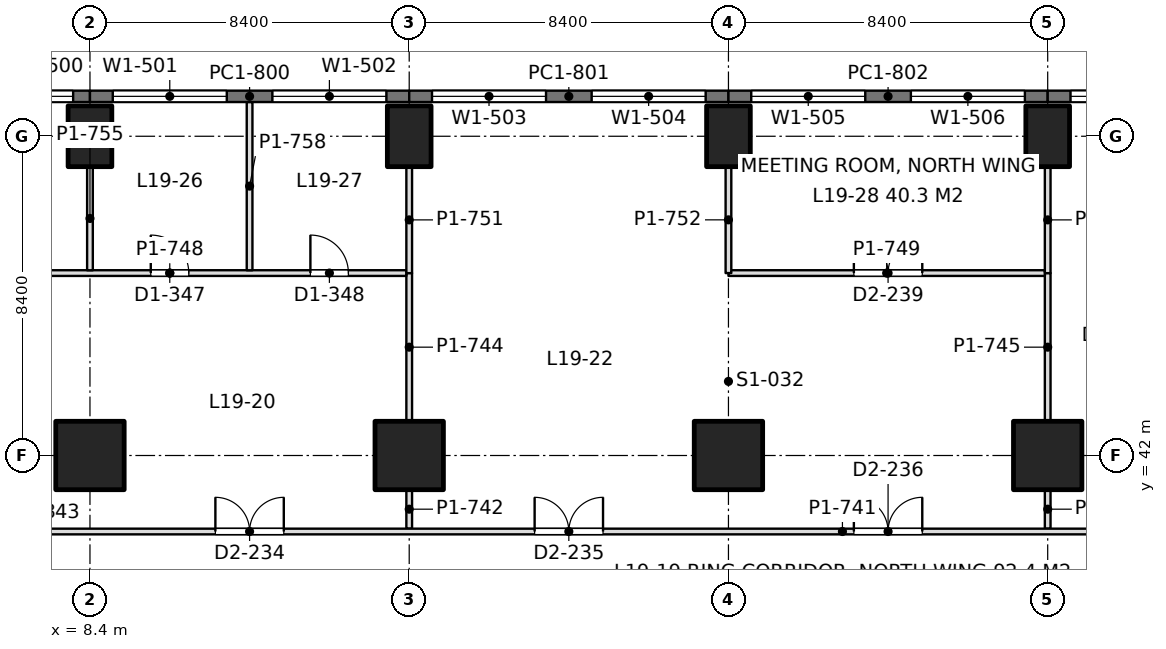
"""IFC4 building model, lengths in metres.
Left out: names, types, materials, properties, quantities, classifications, styles, units other than length and angle.
Written with IfcOpenShell. Run it as: python <this file> out.ifc"""

import sys

from ifc_helpers import new_model, si_unit, direction, frame, frame_2d, origin, origin_2d, place, context, subcontext, project, spatial, rectangle, extrude, element, fill, save


model = new_model("IFC4")
c1 = context("Model", 3, precision=1e-05, world=origin(), true_north=direction((0.0, 1.0)))
c2 = subcontext(c1, "Body", "Model", "MODEL_VIEW")
j1 = project(units=[si_unit("LENGTHUNIT", "METRE"), si_unit("PLANEANGLEUNIT", "RADIAN")], contexts=[c1])
p1 = place(None, origin())
s1 = spatial("IfcSite", under=j1, at=p1, CompositionType="ELEMENT")
p2 = place(p1, origin())
s2 = spatial("IfcBuilding", under=s1, at=p2, CompositionType="ELEMENT")
p3 = place(p2, frame((0.0, 0.0, 86.4)))
s3 = spatial("IfcBuildingStorey", under=s2, at=p3, CompositionType="ELEMENT", Elevation=86.4)
p4 = place(p3, frame((8.4, 42.0, 0.0), z_axis=(0.0, 0.0, 1.0), x_axis=(1.0, 0.0, 0.0)))
e1 = element("IfcColumn", 1, at=p4, inside=s3, PredefinedType="COLUMN", context=c2, shape_type="SweptSolid", body=[
    extrude(rectangle(XDim=1.8, YDim=1.8, at=origin_2d()), origin(), (0.0, 0.0, 1.0), 4.5),
])
p5 = place(p3, frame((8.4, 50.4, 0.0), z_axis=(0.0, 0.0, 1.0), x_axis=(1.0, 0.0, 0.0)))
e2 = element("IfcColumn", 2, at=p5, inside=s3, PredefinedType="COLUMN", context=c2, shape_type="SweptSolid", body=[
    extrude(rectangle(XDim=1.15, YDim=1.6, at=origin_2d()), origin(), (0.0, 0.0, 1.0), 4.5),
])
p6 = place(p3, frame((16.8, 42.0, 0.0), z_axis=(0.0, 0.0, 1.0), x_axis=(1.0, 0.0, 0.0)))
e3 = element("IfcColumn", 3, at=p6, inside=s3, PredefinedType="COLUMN", context=c2, shape_type="SweptSolid", body=[
    extrude(rectangle(XDim=1.8, YDim=1.8, at=origin_2d()), origin(), (0.0, 0.0, 1.0), 4.5),
])
p7 = place(p3, frame((16.8, 50.4, 0.0), z_axis=(0.0, 0.0, 1.0), x_axis=(1.0, 0.0, 0.0)))
e4 = element("IfcColumn", 4, at=p7, inside=s3, PredefinedType="COLUMN", context=c2, shape_type="SweptSolid", body=[
    extrude(rectangle(XDim=1.15, YDim=1.6, at=origin_2d()), origin(), (0.0, 0.0, 1.0), 4.5),
])
p8 = place(p3, frame((25.2, 42.0, 0.0), z_axis=(0.0, 0.0, 1.0), x_axis=(1.0, 0.0, 0.0)))
e5 = element("IfcColumn", 5, at=p8, inside=s3, PredefinedType="COLUMN", context=c2, shape_type="SweptSolid", body=[
    extrude(rectangle(XDim=1.8, YDim=1.8, at=origin_2d()), origin(), (0.0, 0.0, 1.0), 4.5),
])
p9 = place(p3, frame((25.2, 50.4, 0.0), z_axis=(0.0, 0.0, 1.0), x_axis=(1.0, 0.0, 0.0)))
e6 = element("IfcColumn", 6, at=p9, inside=s3, PredefinedType="COLUMN", context=c2, shape_type="SweptSolid", body=[
    extrude(rectangle(XDim=1.15, YDim=1.6, at=origin_2d()), origin(), (0.0, 0.0, 1.0), 4.5),
])
p10 = place(p3, frame((33.6, 42.0, 0.0), z_axis=(0.0, 0.0, 1.0), x_axis=(1.0, 0.0, 0.0)))
e7 = element("IfcColumn", 7, at=p10, inside=s3, PredefinedType="COLUMN", context=c2, shape_type="SweptSolid", body=[
    extrude(rectangle(XDim=1.8, YDim=1.8, at=origin_2d()), origin(), (0.0, 0.0, 1.0), 4.5),
])
p11 = place(p3, frame((33.6, 50.4, 0.0), z_axis=(0.0, 0.0, 1.0), x_axis=(1.0, 0.0, 0.0)))
e8 = element("IfcColumn", 8, at=p11, inside=s3, PredefinedType="COLUMN", context=c2, shape_type="SweptSolid", body=[
    extrude(rectangle(XDim=1.15, YDim=1.6, at=origin_2d()), origin(), (0.0, 0.0, 1.0), 4.5),
])
p12 = place(p3, frame((0.315, 51.45, 0.0), z_axis=(0.0, 0.0, 1.0), x_axis=(1.0, 0.0, 0.0)))
e9 = element("IfcWall", 9, at=p12, inside=s3, PredefinedType="SOLIDWALL", context=c2, shape_type="SweptSolid", body=[
    extrude(rectangle(XDim=8.085, YDim=0.3, at=frame_2d((4.042, 0.0))), origin(), (0.0, 0.0, 1.0), 4.3),
])
p13 = place(p12, frame((0.443, 0.0, 0.9)))
e10 = element("IfcOpeningElement", 10, at=p13, cuts=e9, PredefinedType="OPENING", context=c2, shape_type="SweptSolid", body=[
    extrude(rectangle(XDim=3.0, YDim=1.9, at=frame_2d((1.5, 0.95))), frame((0.0, 0.16, 0.0), z_axis=(0.0, -1.0, 0.0), x_axis=(1.0, 0.0, 0.0)), (0.0, 0.0, 1.0), 0.32),
])
p14 = place(p12, frame((4.643, 0.0, 0.9)))
e11 = element("IfcOpeningElement", 11, at=p14, cuts=e9, PredefinedType="OPENING", context=c2, shape_type="SweptSolid", body=[
    extrude(rectangle(XDim=3.0, YDim=1.9, at=frame_2d((1.5, 0.95))), frame((0.0, 0.16, 0.0), z_axis=(0.0, -1.0, 0.0), x_axis=(1.0, 0.0, 0.0)), (0.0, 0.0, 1.0), 0.32),
])
p15 = place(p3, frame((8.4, 51.45, 0.0), z_axis=(0.0, 0.0, 1.0), x_axis=(1.0, 0.0, 0.0)))
e12 = element("IfcWall", 12, at=p15, inside=s3, PredefinedType="SOLIDWALL", context=c2, shape_type="SweptSolid", body=[
    extrude(rectangle(XDim=8.4, YDim=0.3, at=frame_2d((4.2, 0.0))), origin(), (0.0, 0.0, 1.0), 4.3),
])
p16 = place(p15, frame((0.6, 0.0, 0.9)))
e13 = element("IfcOpeningElement", 13, at=p16, cuts=e12, PredefinedType="OPENING", context=c2, shape_type="SweptSolid", body=[
    extrude(rectangle(XDim=3.0, YDim=1.9, at=frame_2d((1.5, 0.95))), frame((0.0, 0.16, 0.0), z_axis=(0.0, -1.0, 0.0), x_axis=(1.0, 0.0, 0.0)), (0.0, 0.0, 1.0), 0.32),
])
p17 = place(p15, frame((4.8, 0.0, 0.9)))
e14 = element("IfcOpeningElement", 14, at=p17, cuts=e12, PredefinedType="OPENING", context=c2, shape_type="SweptSolid", body=[
    extrude(rectangle(XDim=3.0, YDim=1.9, at=frame_2d((1.5, 0.95))), frame((0.0, 0.16, 0.0), z_axis=(0.0, -1.0, 0.0), x_axis=(1.0, 0.0, 0.0)), (0.0, 0.0, 1.0), 0.32),
])
p18 = place(p3, frame((16.8, 51.45, 0.0), z_axis=(0.0, 0.0, 1.0), x_axis=(1.0, 0.0, 0.0)))
e15 = element("IfcWall", 15, at=p18, inside=s3, PredefinedType="SOLIDWALL", context=c2, shape_type="SweptSolid", body=[
    extrude(rectangle(XDim=8.4, YDim=0.3, at=frame_2d((4.2, 0.0))), origin(), (0.0, 0.0, 1.0), 4.3),
])
p19 = place(p18, frame((0.6, 0.0, 0.9)))
e16 = element("IfcOpeningElement", 16, at=p19, cuts=e15, PredefinedType="OPENING", context=c2, shape_type="SweptSolid", body=[
    extrude(rectangle(XDim=3.0, YDim=1.9, at=frame_2d((1.5, 0.95))), frame((0.0, 0.16, 0.0), z_axis=(0.0, -1.0, 0.0), x_axis=(1.0, 0.0, 0.0)), (0.0, 0.0, 1.0), 0.32),
])
p20 = place(p18, frame((4.8, 0.0, 0.9)))
e17 = element("IfcOpeningElement", 17, at=p20, cuts=e15, PredefinedType="OPENING", context=c2, shape_type="SweptSolid", body=[
    extrude(rectangle(XDim=3.0, YDim=1.9, at=frame_2d((1.5, 0.95))), frame((0.0, 0.16, 0.0), z_axis=(0.0, -1.0, 0.0), x_axis=(1.0, 0.0, 0.0)), (0.0, 0.0, 1.0), 0.32),
])
p21 = place(p3, frame((25.2, 51.45, 0.0), z_axis=(0.0, 0.0, 1.0), x_axis=(1.0, 0.0, 0.0)))
e18 = element("IfcWall", 18, at=p21, inside=s3, PredefinedType="SOLIDWALL", context=c2, shape_type="SweptSolid", body=[
    extrude(rectangle(XDim=8.4, YDim=0.3, at=frame_2d((4.2, 0.0))), origin(), (0.0, 0.0, 1.0), 4.3),
])
p22 = place(p21, frame((0.6, 0.0, 0.9)))
e19 = element("IfcOpeningElement", 19, at=p22, cuts=e18, PredefinedType="OPENING", context=c2, shape_type="SweptSolid", body=[
    extrude(rectangle(XDim=3.0, YDim=1.9, at=frame_2d((1.5, 0.95))), frame((0.0, 0.16, 0.0), z_axis=(0.0, -1.0, 0.0), x_axis=(1.0, 0.0, 0.0)), (0.0, 0.0, 1.0), 0.32),
])
p23 = place(p21, frame((4.8, 0.0, 0.9)))
e20 = element("IfcOpeningElement", 20, at=p23, cuts=e18, PredefinedType="OPENING", context=c2, shape_type="SweptSolid", body=[
    extrude(rectangle(XDim=3.0, YDim=1.9, at=frame_2d((1.5, 0.95))), frame((0.0, 0.16, 0.0), z_axis=(0.0, -1.0, 0.0), x_axis=(1.0, 0.0, 0.0)), (0.0, 0.0, 1.0), 0.32),
])
p24 = place(p3, frame((33.6, 51.45, 0.0), z_axis=(0.0, 0.0, 1.0), x_axis=(1.0, 0.0, 0.0)))
e21 = element("IfcWall", 21, at=p24, inside=s3, PredefinedType="SOLIDWALL", context=c2, shape_type="SweptSolid", body=[
    extrude(rectangle(XDim=8.4, YDim=0.3, at=frame_2d((4.2, 0.0))), origin(), (0.0, 0.0, 1.0), 4.3),
])
p25 = place(p24, frame((0.6, 0.0, 0.9)))
e22 = element("IfcOpeningElement", 22, at=p25, cuts=e21, PredefinedType="OPENING", context=c2, shape_type="SweptSolid", body=[
    extrude(rectangle(XDim=3.0, YDim=1.9, at=frame_2d((1.5, 0.95))), frame((0.0, 0.16, 0.0), z_axis=(0.0, -1.0, 0.0), x_axis=(1.0, 0.0, 0.0)), (0.0, 0.0, 1.0), 0.32),
])
p26 = place(p24, frame((4.8, 0.0, 0.9)))
e23 = element("IfcOpeningElement", 23, at=p26, cuts=e21, PredefinedType="OPENING", context=c2, shape_type="SweptSolid", body=[
    extrude(rectangle(XDim=3.0, YDim=1.9, at=frame_2d((1.5, 0.95))), frame((0.0, 0.16, 0.0), z_axis=(0.0, -1.0, 0.0), x_axis=(1.0, 0.0, 0.0)), (0.0, 0.0, 1.0), 0.32),
])
p27 = place(p3, frame((4.274, 46.8, 0.0), z_axis=(0.0, 0.0, 1.0), x_axis=(1.0, 0.0, 0.0)))
e24 = element("IfcWall", 24, at=p27, inside=s3, PredefinedType="PARTITIONING", context=c2, shape_type="SweptSolid", body=[
    extrude(rectangle(XDim=12.452, YDim=0.15, at=frame_2d((6.226, 0.0))), origin(), (0.0, 0.0, 1.0), 3.6),
])
p28 = place(p27, frame((1.526, 0.0, 0.0)))
e25 = element("IfcOpeningElement", 25, at=p28, cuts=e24, PredefinedType="OPENING", context=c2, shape_type="SweptSolid", body=[
    extrude(rectangle(XDim=1.0, YDim=2.2, at=frame_2d((0.5, 1.1))), frame((0.0, 0.085, 0.0), z_axis=(0.0, -1.0, 0.0), x_axis=(1.0, 0.0, 0.0)), (0.0, 0.0, 1.0), 0.17),
])
p29 = place(p27, frame((5.726, 0.0, 0.0)))
e26 = element("IfcOpeningElement", 26, at=p29, cuts=e24, PredefinedType="OPENING", context=c2, shape_type="SweptSolid", body=[
    extrude(rectangle(XDim=1.0, YDim=2.2, at=frame_2d((0.5, 1.1))), frame((0.0, 0.085, 0.0), z_axis=(0.0, -1.0, 0.0), x_axis=(1.0, 0.0, 0.0)), (0.0, 0.0, 1.0), 0.17),
])
p30 = place(p27, frame((9.926, 0.0, 0.0)))
e27 = element("IfcOpeningElement", 27, at=p30, cuts=e24, PredefinedType="OPENING", context=c2, shape_type="SweptSolid", body=[
    extrude(rectangle(XDim=1.0, YDim=2.2, at=frame_2d((0.5, 1.1))), frame((0.0, 0.085, 0.0), z_axis=(0.0, -1.0, 0.0), x_axis=(1.0, 0.0, 0.0)), (0.0, 0.0, 1.0), 0.17),
])
p31 = place(p3, frame((8.4, 46.874, 0.0), z_axis=(0.0, 0.0, 1.0), x_axis=(0.0, 1.0, 0.0)))
e28 = element("IfcWall", 28, at=p31, inside=s3, PredefinedType="PARTITIONING", context=c2, shape_type="SweptSolid", body=[
    extrude(rectangle(XDim=2.727, YDim=0.15, at=frame_2d((1.364, 0.0))), origin(), (0.0, 0.0, 1.0), 3.6),
])
p32 = place(p3, frame((12.6, 46.874, 0.0), z_axis=(0.0, 0.0, 1.0), x_axis=(0.0, 1.0, 0.0)))
e29 = element("IfcWall", 29, at=p32, inside=s3, PredefinedType="PARTITIONING", context=c2, shape_type="SweptSolid", body=[
    extrude(rectangle(XDim=4.428, YDim=0.15, at=frame_2d((2.214, 0.0))), origin(), (0.0, 0.0, 1.0), 3.854),
])
p33 = place(p3, frame((16.8, 46.798, 0.0), z_axis=(0.0, 0.0, 1.0), x_axis=(0.0, 1.0, 0.0)))
e30 = element("IfcWall", 30, at=p33, inside=s3, PredefinedType="PARTITIONING", context=c2, shape_type="SweptSolid", body=[
    extrude(rectangle(XDim=2.803, YDim=0.15, at=frame_2d((1.401, 0.0))), origin(), (0.0, 0.0, 1.0), 3.6),
])
p34 = place(p3, frame((25.2, 46.8, 0.0), z_axis=(0.0, 0.0, 1.0), x_axis=(1.0, 0.0, 0.0)))
e31 = element("IfcWall", 31, at=p34, inside=s3, PredefinedType="PARTITIONING", context=c2, shape_type="SweptSolid", body=[
    extrude(rectangle(XDim=8.326, YDim=0.15, at=frame_2d((4.163, 0.0))), origin(), (0.0, 0.0, 1.0), 3.6),
])
p35 = place(p34, frame((3.3, 0.0, 0.0)))
e32 = element("IfcOpeningElement", 32, at=p35, cuts=e31, PredefinedType="OPENING", context=c2, shape_type="SweptSolid", body=[
    extrude(rectangle(XDim=1.8, YDim=2.2, at=frame_2d((0.9, 1.1))), frame((0.0, 0.085, 0.0), z_axis=(0.0, -1.0, 0.0), x_axis=(1.0, 0.0, 0.0)), (0.0, 0.0, 1.0), 0.17),
])
p36 = place(p3, frame((25.2, 46.8, 0.0), z_axis=(0.0, 0.0, 1.0), x_axis=(0.0, 1.0, 0.0)))
e33 = element("IfcWall", 33, at=p36, inside=s3, PredefinedType="PARTITIONING", context=c2, shape_type="SweptSolid", body=[
    extrude(rectangle(XDim=2.801, YDim=0.15, at=frame_2d((1.4, 0.0))), origin(), (0.0, 0.0, 1.0), 3.6),
])
p37 = place(p3, frame((33.6, 46.798, 0.0), z_axis=(0.0, 0.0, 1.0), x_axis=(0.0, 1.0, 0.0)))
e34 = element("IfcWall", 34, at=p37, inside=s3, PredefinedType="PARTITIONING", context=c2, shape_type="SweptSolid", body=[
    extrude(rectangle(XDim=2.803, YDim=0.15, at=frame_2d((1.401, 0.0))), origin(), (0.0, 0.0, 1.0), 3.6),
])
p38 = place(p3, frame((16.8, 40.074, 0.0), z_axis=(0.0, 0.0, 1.0), x_axis=(0.0, 1.0, 0.0)))
e35 = element("IfcWall", 35, at=p38, inside=s3, PredefinedType="PARTITIONING", context=c2, shape_type="SweptSolid", body=[
    extrude(rectangle(XDim=1.027, YDim=0.15, at=frame_2d((0.514, 0.0))), origin(), (0.0, 0.0, 1.0), 3.804),
])
p39 = place(p3, frame((16.8, 42.899, 0.0), z_axis=(0.0, 0.0, 1.0), x_axis=(0.0, 1.0, 0.0)))
e36 = element("IfcWall", 36, at=p39, inside=s3, PredefinedType="PARTITIONING", context=c2, shape_type="SweptSolid", body=[
    extrude(rectangle(XDim=3.903, YDim=0.15, at=frame_2d((1.952, 0.0))), origin(), (0.0, 0.0, 1.0), 3.6),
])
p40 = place(p3, frame((33.6, 40.074, 0.0), z_axis=(0.0, 0.0, 1.0), x_axis=(0.0, 1.0, 0.0)))
e37 = element("IfcWall", 37, at=p40, inside=s3, PredefinedType="PARTITIONING", context=c2, shape_type="SweptSolid", body=[
    extrude(rectangle(XDim=1.027, YDim=0.15, at=frame_2d((0.514, 0.0))), origin(), (0.0, 0.0, 1.0), 3.804),
])
p41 = place(p3, frame((33.6, 42.899, 0.0), z_axis=(0.0, 0.0, 1.0), x_axis=(0.0, 1.0, 0.0)))
e38 = element("IfcWall", 38, at=p41, inside=s3, PredefinedType="PARTITIONING", context=c2, shape_type="SweptSolid", body=[
    extrude(rectangle(XDim=3.903, YDim=0.15, at=frame_2d((1.952, 0.0))), origin(), (0.0, 0.0, 1.0), 3.6),
])
p42 = place(p3, frame((7.198, 40.0, 0.0), z_axis=(0.0, 0.0, 1.0), x_axis=(1.0, 0.0, 0.0)))
e39 = element("IfcWall", 39, at=p42, inside=s3, PredefinedType="PARTITIONING", context=c2, shape_type="SweptSolid", body=[
    extrude(rectangle(XDim=42.002, YDim=0.15, at=frame_2d((21.001, 0.0))), origin(), (0.0, 0.0, 1.0), 3.6),
])
p43 = place(p42, frame((4.502, 0.0, 0.0)))
e40 = element("IfcOpeningElement", 40, at=p43, cuts=e39, PredefinedType="OPENING", context=c2, shape_type="SweptSolid", body=[
    extrude(rectangle(XDim=1.8, YDim=2.2, at=frame_2d((0.9, 1.1))), frame((0.0, 0.085, 0.0), z_axis=(0.0, -1.0, 0.0), x_axis=(1.0, 0.0, 0.0)), (0.0, 0.0, 1.0), 0.17),
])
p44 = place(p42, frame((12.902, 0.0, 0.0)))
e41 = element("IfcOpeningElement", 41, at=p44, cuts=e39, PredefinedType="OPENING", context=c2, shape_type="SweptSolid", body=[
    extrude(rectangle(XDim=1.8, YDim=2.2, at=frame_2d((0.9, 1.1))), frame((0.0, 0.085, 0.0), z_axis=(0.0, -1.0, 0.0), x_axis=(1.0, 0.0, 0.0)), (0.0, 0.0, 1.0), 0.17),
])
p45 = place(p42, frame((21.302, 0.0, 0.0)))
e42 = element("IfcOpeningElement", 42, at=p45, cuts=e39, PredefinedType="OPENING", context=c2, shape_type="SweptSolid", body=[
    extrude(rectangle(XDim=1.8, YDim=2.2, at=frame_2d((0.9, 1.1))), frame((0.0, 0.085, 0.0), z_axis=(0.0, -1.0, 0.0), x_axis=(1.0, 0.0, 0.0)), (0.0, 0.0, 1.0), 0.17),
])
p46 = place(p42, frame((29.702, 0.0, 0.0)))
e43 = element("IfcOpeningElement", 43, at=p46, cuts=e39, PredefinedType="OPENING", context=c2, shape_type="SweptSolid", body=[
    extrude(rectangle(XDim=1.8, YDim=2.2, at=frame_2d((0.9, 1.1))), frame((0.0, 0.085, 0.0), z_axis=(0.0, -1.0, 0.0), x_axis=(1.0, 0.0, 0.0)), (0.0, 0.0, 1.0), 0.17),
])
p47 = place(p42, frame((38.102, 0.0, 0.0)))
e44 = element("IfcOpeningElement", 44, at=p47, cuts=e39, PredefinedType="OPENING", context=c2, shape_type="SweptSolid", body=[
    extrude(rectangle(XDim=1.8, YDim=2.2, at=frame_2d((0.9, 1.1))), frame((0.0, 0.085, 0.0), z_axis=(0.0, -1.0, 0.0), x_axis=(1.0, 0.0, 0.0)), (0.0, 0.0, 1.0), 0.17),
])
p48 = place(p14, origin())
e45 = element("IfcWindow", 45, at=p48, inside=s3, PartitioningType="SINGLE_PANEL", PredefinedType="WINDOW", context=c2, shape_type="SweptSolid", body=[
    extrude(rectangle(XDim=3.0, YDim=1.9, at=frame_2d((1.5, 0.95))), frame((0.0, 0.03, 0.0), z_axis=(0.0, -1.0, 0.0), x_axis=(1.0, 0.0, 0.0)), (0.0, 0.0, 1.0), 0.06),
])
fill(e11, e45)
p49 = place(p16, origin())
e46 = element("IfcWindow", 46, at=p49, inside=s3, PartitioningType="SINGLE_PANEL", PredefinedType="WINDOW", context=c2, shape_type="SweptSolid", body=[
    extrude(rectangle(XDim=3.0, YDim=1.9, at=frame_2d((1.5, 0.95))), frame((0.0, 0.03, 0.0), z_axis=(0.0, -1.0, 0.0), x_axis=(1.0, 0.0, 0.0)), (0.0, 0.0, 1.0), 0.06),
])
fill(e13, e46)
p50 = place(p17, origin())
e47 = element("IfcWindow", 47, at=p50, inside=s3, PartitioningType="SINGLE_PANEL", PredefinedType="WINDOW", context=c2, shape_type="SweptSolid", body=[
    extrude(rectangle(XDim=3.0, YDim=1.9, at=frame_2d((1.5, 0.95))), frame((0.0, 0.03, 0.0), z_axis=(0.0, -1.0, 0.0), x_axis=(1.0, 0.0, 0.0)), (0.0, 0.0, 1.0), 0.06),
])
fill(e14, e47)
p51 = place(p19, origin())
e48 = element("IfcWindow", 48, at=p51, inside=s3, PartitioningType="SINGLE_PANEL", PredefinedType="WINDOW", context=c2, shape_type="SweptSolid", body=[
    extrude(rectangle(XDim=3.0, YDim=1.9, at=frame_2d((1.5, 0.95))), frame((0.0, 0.03, 0.0), z_axis=(0.0, -1.0, 0.0), x_axis=(1.0, 0.0, 0.0)), (0.0, 0.0, 1.0), 0.06),
])
fill(e16, e48)
p52 = place(p20, origin())
e49 = element("IfcWindow", 49, at=p52, inside=s3, PartitioningType="SINGLE_PANEL", PredefinedType="WINDOW", context=c2, shape_type="SweptSolid", body=[
    extrude(rectangle(XDim=3.0, YDim=1.9, at=frame_2d((1.5, 0.95))), frame((0.0, 0.03, 0.0), z_axis=(0.0, -1.0, 0.0), x_axis=(1.0, 0.0, 0.0)), (0.0, 0.0, 1.0), 0.06),
])
fill(e17, e49)
p53 = place(p22, origin())
e50 = element("IfcWindow", 50, at=p53, inside=s3, PartitioningType="SINGLE_PANEL", PredefinedType="WINDOW", context=c2, shape_type="SweptSolid", body=[
    extrude(rectangle(XDim=3.0, YDim=1.9, at=frame_2d((1.5, 0.95))), frame((0.0, 0.03, 0.0), z_axis=(0.0, -1.0, 0.0), x_axis=(1.0, 0.0, 0.0)), (0.0, 0.0, 1.0), 0.06),
])
fill(e19, e50)
p54 = place(p23, origin())
e51 = element("IfcWindow", 51, at=p54, inside=s3, PartitioningType="SINGLE_PANEL", PredefinedType="WINDOW", context=c2, shape_type="SweptSolid", body=[
    extrude(rectangle(XDim=3.0, YDim=1.9, at=frame_2d((1.5, 0.95))), frame((0.0, 0.03, 0.0), z_axis=(0.0, -1.0, 0.0), x_axis=(1.0, 0.0, 0.0)), (0.0, 0.0, 1.0), 0.06),
])
fill(e20, e51)
p55 = place(p25, origin())
e52 = element("IfcWindow", 52, at=p55, inside=s3, PartitioningType="SINGLE_PANEL", PredefinedType="WINDOW", context=c2, shape_type="SweptSolid", body=[
    extrude(rectangle(XDim=3.0, YDim=1.9, at=frame_2d((1.5, 0.95))), frame((0.0, 0.03, 0.0), z_axis=(0.0, -1.0, 0.0), x_axis=(1.0, 0.0, 0.0)), (0.0, 0.0, 1.0), 0.06),
])
fill(e22, e52)
p56 = place(p29, origin())
e53 = element("IfcDoor", 53, at=p56, inside=s3, OperationType="SINGLE_SWING_LEFT", PredefinedType="DOOR", context=c2, shape_type="SweptSolid", body=[
    extrude(rectangle(XDim=1.0, YDim=2.2, at=frame_2d((0.5, 1.1))), frame((0.0, 0.025, 0.0), z_axis=(0.0, -1.0, 0.0), x_axis=(1.0, 0.0, 0.0)), (0.0, 0.0, 1.0), 0.05),
])
fill(e26, e53)
p57 = place(p30, origin())
e54 = element("IfcDoor", 54, at=p57, inside=s3, OperationType="SINGLE_SWING_LEFT", PredefinedType="DOOR", context=c2, shape_type="SweptSolid", body=[
    extrude(rectangle(XDim=1.0, YDim=2.2, at=frame_2d((0.5, 1.1))), frame((0.0, 0.025, 0.0), z_axis=(0.0, -1.0, 0.0), x_axis=(1.0, 0.0, 0.0)), (0.0, 0.0, 1.0), 0.05),
])
fill(e27, e54)
p58 = place(p35, origin())
e55 = element("IfcDoor", 55, at=p58, inside=s3, OperationType="DOUBLE_DOOR_SINGLE_SWING", PredefinedType="DOOR", context=c2, shape_type="SweptSolid", body=[
    extrude(rectangle(XDim=1.8, YDim=2.2, at=frame_2d((0.9, 1.1))), frame((0.0, 0.025, 0.0), z_axis=(0.0, -1.0, 0.0), x_axis=(1.0, 0.0, 0.0)), (0.0, 0.0, 1.0), 0.05),
])
fill(e32, e55)
p59 = place(p43, origin())
e56 = element("IfcDoor", 56, at=p59, inside=s3, OperationType="DOUBLE_DOOR_SINGLE_SWING", PredefinedType="DOOR", context=c2, shape_type="SweptSolid", body=[
    extrude(rectangle(XDim=1.8, YDim=2.2, at=frame_2d((0.9, 1.1))), frame((0.0, 0.025, 0.0), z_axis=(0.0, -1.0, 0.0), x_axis=(1.0, 0.0, 0.0)), (0.0, 0.0, 1.0), 0.05),
])
fill(e40, e56)
p60 = place(p44, origin())
e57 = element("IfcDoor", 57, at=p60, inside=s3, OperationType="DOUBLE_DOOR_SINGLE_SWING", PredefinedType="DOOR", context=c2, shape_type="SweptSolid", body=[
    extrude(rectangle(XDim=1.8, YDim=2.2, at=frame_2d((0.9, 1.1))), frame((0.0, 0.025, 0.0), z_axis=(0.0, -1.0, 0.0), x_axis=(1.0, 0.0, 0.0)), (0.0, 0.0, 1.0), 0.05),
])
fill(e41, e57)
p61 = place(p45, origin())
e58 = element("IfcDoor", 58, at=p61, inside=s3, OperationType="DOUBLE_DOOR_SINGLE_SWING", PredefinedType="DOOR", context=c2, shape_type="SweptSolid", body=[
    extrude(rectangle(XDim=1.8, YDim=2.2, at=frame_2d((0.9, 1.1))), frame((0.0, 0.025, 0.0), z_axis=(0.0, -1.0, 0.0), x_axis=(1.0, 0.0, 0.0)), (0.0, 0.0, 1.0), 0.05),
])
fill(e42, e58)
save(model, sys.argv[1])
